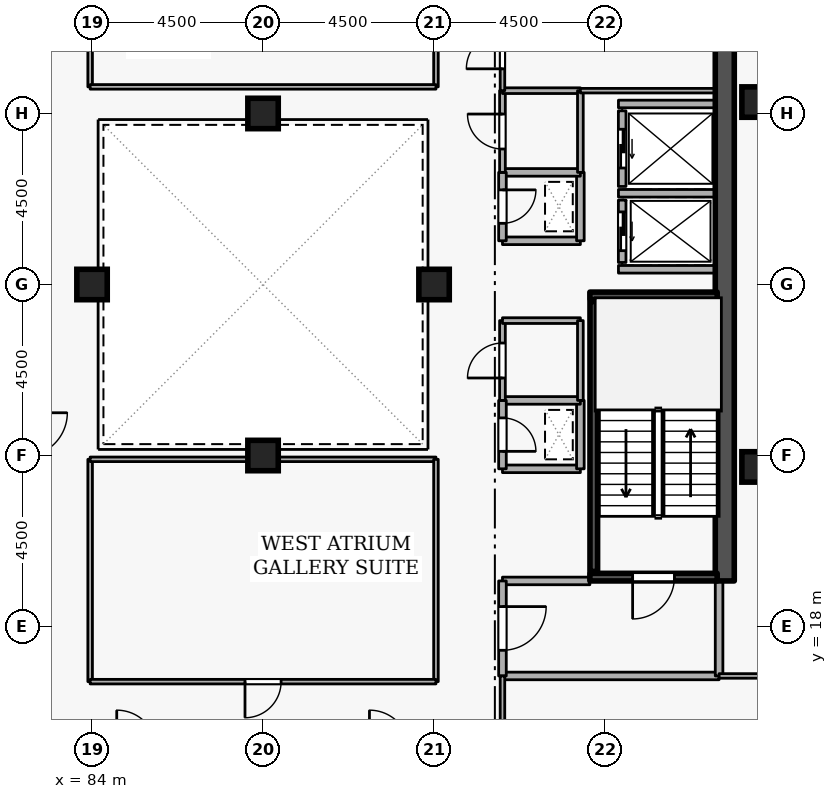
"""IFC4 building model, lengths in metres.
Left out: names, types, materials, properties, quantities, classifications, styles, units other than length and angle.
Written with IfcOpenShell. Run it as: python <this file> out.ifc"""

import sys

from ifc_helpers import new_model, si_unit, direction, frame, frame_2d, origin, origin_2d, place, context, subcontext, project, spatial, rectangle, extrude, element, fill, save


model = new_model("IFC4")
c1 = context("Model", 3, precision=1e-05, world=origin(), true_north=direction((0.0, 1.0)))
c2 = subcontext(c1, "Body", "Model", "MODEL_VIEW")
j1 = project(units=[si_unit("LENGTHUNIT", "METRE"), si_unit("PLANEANGLEUNIT", "RADIAN")], contexts=[c1])
p1 = place(None, origin())
s1 = spatial("IfcSite", under=j1, at=p1, CompositionType="ELEMENT")
p2 = place(p1, origin())
s2 = spatial("IfcBuilding", under=s1, at=p2, CompositionType="ELEMENT")
p3 = place(p2, frame((0.0, 0.0, 258.3)))
s3 = spatial("IfcBuildingStorey", under=s2, at=p3, CompositionType="ELEMENT", Elevation=258.3)
p4 = place(p3, frame((100.65, 19.2, 0.0), z_axis=(0.0, 0.0, 1.0), x_axis=(0.0, 1.0, 0.0)))
e1 = element("IfcWall", 1, at=p4, inside=s3, PredefinedType="SHEAR", context=c2, shape_type="SweptSolid", body=[
    extrude(rectangle(XDim=15.6, YDim=0.5, at=frame_2d((7.8, 0.0))), origin(), (0.0, 0.0, 1.0), 3.6),
])
for number, where, z_axis, x_axis in (
    (2, (101.5, 22.2, 0.0), (0.0, 0.0, 1.0), (1.0, 0.0, 0.0)),
    (3, (101.5, 31.8, 0.0), (0.0, 0.0, 1.0), (1.0, 0.0, 0.0)),
    (4, (93.0, 27.0, 0.0), (0.0, 0.0, 1.0), (1.0, 0.0, 0.0)),
    (5, (84.0, 27.0, 0.0), (0.0, 0.0, 1.0), (1.0, 0.0, 0.0)),
    (6, (88.5, 22.5, 0.0), (0.0, 0.0, 1.0), (1.0, 0.0, 0.0)),
    (7, (88.5, 31.5, 0.0), (0.0, 0.0, 1.0), (1.0, 0.0, 0.0)),
):
    element("IfcColumn", number, at=place(p3, frame(where, z_axis=z_axis, x_axis=x_axis)), inside=s3, PredefinedType="COLUMN", context=c2, shape_type="SweptSolid", body=[
        extrude(rectangle(XDim=0.8, YDim=0.8, at=origin_2d()), origin(), (0.0, 0.0, 1.0), 3.6),
    ])
p5 = place(p3, frame((97.95, 29.22, 0.0), z_axis=(0.0, 0.0, 1.0), x_axis=(0.0, -1.0, 0.0)))
e8 = element("IfcWall", 8, at=p5, inside=s3, PredefinedType="STANDARD", context=c2, shape_type="SweptSolid", body=[
    extrude(rectangle(XDim=1.64, YDim=0.2, at=frame_2d((0.82, 0.0))), origin(), (0.0, 0.0, 1.0), 3.34),
])
p6 = place(p5, frame((0.31, 0.0, 0.0)))
e9 = element("IfcOpeningElement", 9, at=p6, cuts=e8, PredefinedType="OPENING", context=c2, shape_type="SweptSolid", body=[
    extrude(rectangle(XDim=1.02, YDim=2.06, at=frame_2d((0.51, 1.03))), frame((0.0, 0.11, 0.0), z_axis=(0.0, -1.0, 0.0), x_axis=(1.0, 0.0, 0.0)), (0.0, 0.0, 1.0), 0.22),
])
p7 = place(p3, frame((97.95, 31.57, 0.0), z_axis=(0.0, 0.0, 1.0), x_axis=(0.0, -1.0, 0.0)))
e10 = element("IfcWall", 10, at=p7, inside=s3, PredefinedType="STANDARD", context=c2, shape_type="SweptSolid", body=[
    extrude(rectangle(XDim=1.99, YDim=0.2, at=frame_2d((0.995, 0.0))), origin(), (0.0, 0.0, 1.0), 3.34),
])
p8 = place(p7, frame((0.485, 0.0, 0.0)))
e11 = element("IfcOpeningElement", 11, at=p8, cuts=e10, PredefinedType="OPENING", context=c2, shape_type="SweptSolid", body=[
    extrude(rectangle(XDim=1.02, YDim=2.06, at=frame_2d((0.51, 1.03))), frame((0.0, 0.11, 0.0), z_axis=(0.0, -1.0, 0.0), x_axis=(1.0, 0.0, 0.0)), (0.0, 0.0, 1.0), 0.22),
])
for number, where, z_axis, x_axis in (
    (12, (97.852, 29.4, 0.0), (0.0, 0.0, 1.0), (1.0, 0.0, 0.0)),
    (13, (97.852, 27.4, 0.0), (0.0, 0.0, 1.0), (1.0, 0.0, 0.0)),
    (14, (97.852, 31.75, 0.0), (0.0, 0.0, 1.0), (1.0, 0.0, 0.0)),
):
    element("IfcWall", number, at=place(p3, frame(where, z_axis=z_axis, x_axis=x_axis)), inside=s3, PredefinedType="STANDARD", context=c2, shape_type="SweptSolid", body=[
        extrude(rectangle(XDim=2.536, YDim=0.2, at=frame_2d((1.268, 0.0))), origin(), (0.0, 0.0, 1.0), 3.34),
    ])
p9 = place(p3, frame((100.45, 19.3, 0.0), z_axis=(0.0, 0.0, 1.0), x_axis=(-1.0, 0.0, 0.0)))
e15 = element("IfcWall", 15, at=p9, inside=s3, PredefinedType="SHEAR", context=c2, shape_type="SweptSolid", body=[
    extrude(rectangle(XDim=3.35, YDim=0.2, at=frame_2d((1.675, 0.0))), origin(), (0.0, 0.0, 1.0), 3.6),
])
p10 = place(p9, frame((1.125, 0.0, 0.0)))
e16 = element("IfcOpeningElement", 16, at=p10, cuts=e15, PredefinedType="OPENING", context=c2, shape_type="SweptSolid", body=[
    extrude(rectangle(XDim=1.1, YDim=2.1, at=frame_2d((0.55, 1.05))), frame((0.0, 0.11, 0.0), z_axis=(0.0, -1.0, 0.0), x_axis=(1.0, 0.0, 0.0)), (0.0, 0.0, 1.0), 0.22),
])
p11 = place(p3, frame((97.1, 26.7, 0.0), z_axis=(0.0, 0.0, 1.0), x_axis=(1.0, 0.0, 0.0)))
e17 = element("IfcWall", 17, at=p11, inside=s3, PredefinedType="SHEAR", context=c2, shape_type="SweptSolid", body=[
    extrude(rectangle(XDim=3.35, YDim=0.2, at=frame_2d((1.675, 0.0))), origin(), (0.0, 0.0, 1.0), 3.6),
])
p12 = place(p3, frame((97.203, 26.55, 0.0), z_axis=(0.0, 0.0, 1.0), x_axis=(0.0, -1.0, 0.0)))
e18 = element("IfcWall", 18, at=p12, inside=s3, PredefinedType="SHEAR", context=c2, shape_type="SweptSolid", body=[
    extrude(rectangle(XDim=7.1, YDim=0.2, at=frame_2d((3.55, 0.0))), origin(), (0.0, 0.0, 1.0), 3.6),
])
p13 = place(p3, frame((94.8, 16.7, 0.0), z_axis=(0.0, 0.0, 1.0), x_axis=(1.0, 0.0, 0.0)))
e19 = element("IfcWall", 19, at=p13, inside=s3, PredefinedType="STANDARD", context=c2, shape_type="SweptSolid", body=[
    extrude(rectangle(XDim=5.7, YDim=0.2, at=frame_2d((2.85, 0.0))), origin(), (0.0, 0.0, 1.0), 3.34),
])
p14 = place(p3, frame((100.5, 16.7, 0.0), z_axis=(0.0, 0.0, 1.0), x_axis=(0.0, 1.0, 0.0)))
e20 = element("IfcWall", 20, at=p14, inside=s3, PredefinedType="STANDARD", context=c2, shape_type="SweptSolid", body=[
    extrude(rectangle(XDim=2.5, YDim=0.2, at=frame_2d((1.25, 0.0))), origin(), (0.0, 0.0, 1.0), 3.34),
])
p15 = place(p3, frame((97.1, 19.2, 0.0), z_axis=(0.0, 0.0, 1.0), x_axis=(-1.0, 0.0, 0.0)))
e21 = element("IfcWall", 21, at=p15, inside=s3, PredefinedType="STANDARD", context=c2, shape_type="SweptSolid", body=[
    extrude(rectangle(XDim=2.3, YDim=0.2, at=frame_2d((1.15, 0.0))), origin(), (0.0, 0.0, 1.0), 2.545),
])
p16 = place(p3, frame((94.8, 19.2, 0.0), z_axis=(0.0, 0.0, 1.0), x_axis=(0.0, -1.0, 0.0)))
e22 = element("IfcWall", 22, at=p16, inside=s3, PredefinedType="STANDARD", context=c2, shape_type="SweptSolid", body=[
    extrude(rectangle(XDim=2.5, YDim=0.2, at=frame_2d((1.25, 0.0))), origin(), (0.0, 0.0, 1.0), 3.34),
])
p17 = place(p16, frame((0.675, 0.0, 0.0)))
e23 = element("IfcOpeningElement", 23, at=p17, cuts=e22, PredefinedType="OPENING", context=c2, shape_type="SweptSolid", body=[
    extrude(rectangle(XDim=1.15, YDim=2.1, at=frame_2d((0.575, 1.05))), frame((0.0, 0.11, 0.0), z_axis=(0.0, -1.0, 0.0), x_axis=(1.0, 0.0, 0.0)), (0.0, 0.0, 1.0), 0.22),
])
p18 = place(p3, frame((94.8, 28.15, 0.0), z_axis=(0.0, 0.0, 1.0), x_axis=(1.0, 0.0, 0.0)))
e24 = element("IfcWall", 24, at=p18, inside=s3, PredefinedType="STANDARD", context=c2, shape_type="SweptSolid", body=[
    extrude(rectangle(XDim=2.05, YDim=0.2, at=frame_2d((1.025, 0.0))), origin(), (0.0, 0.0, 1.0), 3.34),
])
p19 = place(p3, frame((96.85, 28.15, 0.0), z_axis=(0.0, 0.0, 1.0), x_axis=(0.0, 1.0, 0.0)))
e25 = element("IfcWall", 25, at=p19, inside=s3, PredefinedType="STANDARD", context=c2, shape_type="SweptSolid", body=[
    extrude(rectangle(XDim=1.8, YDim=0.2, at=frame_2d((0.9, 0.0))), origin(), (0.0, 0.0, 1.0), 3.34),
])
p20 = place(p3, frame((96.85, 29.95, 0.0), z_axis=(0.0, 0.0, 1.0), x_axis=(-1.0, 0.0, 0.0)))
e26 = element("IfcWall", 26, at=p20, inside=s3, PredefinedType="STANDARD", context=c2, shape_type="SweptSolid", body=[
    extrude(rectangle(XDim=2.05, YDim=0.2, at=frame_2d((1.025, 0.0))), origin(), (0.0, 0.0, 1.0), 3.34),
])
p21 = place(p3, frame((94.8, 29.95, 0.0), z_axis=(0.0, 0.0, 1.0), x_axis=(0.0, -1.0, 0.0)))
e27 = element("IfcWall", 27, at=p21, inside=s3, PredefinedType="STANDARD", context=c2, shape_type="SweptSolid", body=[
    extrude(rectangle(XDim=1.8, YDim=0.2, at=frame_2d((0.9, 0.0))), origin(), (0.0, 0.0, 1.0), 3.34),
])
p22 = place(p21, frame((0.46, 0.0, 0.0)))
e28 = element("IfcOpeningElement", 28, at=p22, cuts=e27, PredefinedType="OPENING", context=c2, shape_type="SweptSolid", body=[
    extrude(rectangle(XDim=0.88, YDim=2.04, at=frame_2d((0.44, 1.02))), frame((0.0, 0.11, 0.0), z_axis=(0.0, -1.0, 0.0), x_axis=(1.0, 0.0, 0.0)), (0.0, 0.0, 1.0), 0.22),
])
p23 = place(p3, frame((94.8, 22.15, 0.0), z_axis=(0.0, 0.0, 1.0), x_axis=(1.0, 0.0, 0.0)))
e29 = element("IfcWall", 29, at=p23, inside=s3, PredefinedType="STANDARD", context=c2, shape_type="SweptSolid", body=[
    extrude(rectangle(XDim=2.05, YDim=0.2, at=frame_2d((1.025, 0.0))), origin(), (0.0, 0.0, 1.0), 3.34),
])
p24 = place(p3, frame((96.85, 22.15, 0.0), z_axis=(0.0, 0.0, 1.0), x_axis=(0.0, 1.0, 0.0)))
e30 = element("IfcWall", 30, at=p24, inside=s3, PredefinedType="STANDARD", context=c2, shape_type="SweptSolid", body=[
    extrude(rectangle(XDim=1.8, YDim=0.2, at=frame_2d((0.9, 0.0))), origin(), (0.0, 0.0, 1.0), 3.34),
])
p25 = place(p3, frame((96.85, 23.95, 0.0), z_axis=(0.0, 0.0, 1.0), x_axis=(-1.0, 0.0, 0.0)))
e31 = element("IfcWall", 31, at=p25, inside=s3, PredefinedType="STANDARD", context=c2, shape_type="SweptSolid", body=[
    extrude(rectangle(XDim=2.05, YDim=0.2, at=frame_2d((1.025, 0.0))), origin(), (0.0, 0.0, 1.0), 3.34),
])
p26 = place(p3, frame((94.8, 23.95, 0.0), z_axis=(0.0, 0.0, 1.0), x_axis=(0.0, -1.0, 0.0)))
e32 = element("IfcWall", 32, at=p26, inside=s3, PredefinedType="STANDARD", context=c2, shape_type="SweptSolid", body=[
    extrude(rectangle(XDim=1.8, YDim=0.2, at=frame_2d((0.9, 0.0))), origin(), (0.0, 0.0, 1.0), 3.34),
])
p27 = place(p26, frame((0.46, 0.0, 0.0)))
e33 = element("IfcOpeningElement", 33, at=p27, cuts=e32, PredefinedType="OPENING", context=c2, shape_type="SweptSolid", body=[
    extrude(rectangle(XDim=0.88, YDim=2.04, at=frame_2d((0.44, 1.02))), frame((0.0, 0.11, 0.0), z_axis=(0.0, -1.0, 0.0), x_axis=(1.0, 0.0, 0.0)), (0.0, 0.0, 1.0), 0.22),
])
p28 = place(p3, frame((94.8, 23.95, 0.0), z_axis=(0.0, 0.0, 1.0), x_axis=(0.0, 1.0, 0.0)))
e34 = element("IfcWall", 34, at=p28, inside=s3, PredefinedType="PARTITIONING", context=c2, shape_type="SweptSolid", body=[
    extrude(rectangle(XDim=2.1, YDim=0.15, at=frame_2d((1.05, 0.0))), origin(), (0.0, 0.0, 1.0), 3.34),
])
p29 = place(p28, frame((0.59, 0.0, 0.0)))
e35 = element("IfcOpeningElement", 35, at=p29, cuts=e34, PredefinedType="OPENING", context=c2, shape_type="SweptSolid", body=[
    extrude(rectangle(XDim=0.92, YDim=2.08, at=frame_2d((0.46, 1.04))), frame((0.0, 0.085, 0.0), z_axis=(0.0, -1.0, 0.0), x_axis=(1.0, 0.0, 0.0)), (0.0, 0.0, 1.0), 0.17),
])
p30 = place(p3, frame((94.8, 26.05, 0.0), z_axis=(0.0, 0.0, 1.0), x_axis=(1.0, 0.0, 0.0)))
e36 = element("IfcWall", 36, at=p30, inside=s3, PredefinedType="PARTITIONING", context=c2, shape_type="SweptSolid", body=[
    extrude(rectangle(XDim=2.05, YDim=0.15, at=frame_2d((1.025, 0.0))), origin(), (0.0, 0.0, 1.0), 3.34),
])
p31 = place(p3, frame((96.85, 26.05, 0.0), z_axis=(0.0, 0.0, 1.0), x_axis=(0.0, -1.0, 0.0)))
e37 = element("IfcWall", 37, at=p31, inside=s3, PredefinedType="PARTITIONING", context=c2, shape_type="SweptSolid", body=[
    extrude(rectangle(XDim=2.1, YDim=0.15, at=frame_2d((1.05, 0.0))), origin(), (0.0, 0.0, 1.0), 3.34),
])
p32 = place(p3, frame((94.8, 29.95, 0.0), z_axis=(0.0, 0.0, 1.0), x_axis=(0.0, 1.0, 0.0)))
e38 = element("IfcWall", 38, at=p32, inside=s3, PredefinedType="PARTITIONING", context=c2, shape_type="SweptSolid", body=[
    extrude(rectangle(XDim=2.15, YDim=0.15, at=frame_2d((1.075, 0.0))), origin(), (0.0, 0.0, 1.0), 3.34),
])
p33 = place(p32, frame((0.615, 0.0, 0.0)))
e39 = element("IfcOpeningElement", 39, at=p33, cuts=e38, PredefinedType="OPENING", context=c2, shape_type="SweptSolid", body=[
    extrude(rectangle(XDim=0.92, YDim=2.08, at=frame_2d((0.46, 1.04))), frame((0.0, 0.085, 0.0), z_axis=(0.0, -1.0, 0.0), x_axis=(1.0, 0.0, 0.0)), (0.0, 0.0, 1.0), 0.17),
])
p34 = place(p3, frame((94.8, 32.1, 0.0), z_axis=(0.0, 0.0, 1.0), x_axis=(1.0, 0.0, 0.0)))
e40 = element("IfcWall", 40, at=p34, inside=s3, PredefinedType="PARTITIONING", context=c2, shape_type="SweptSolid", body=[
    extrude(rectangle(XDim=2.05, YDim=0.15, at=frame_2d((1.025, 0.0))), origin(), (0.0, 0.0, 1.0), 3.34),
])
p35 = place(p3, frame((96.85, 32.1, 0.0), z_axis=(0.0, 0.0, 1.0), x_axis=(0.0, -1.0, 0.0)))
e41 = element("IfcWall", 41, at=p35, inside=s3, PredefinedType="PARTITIONING", context=c2, shape_type="SweptSolid", body=[
    extrude(rectangle(XDim=2.15, YDim=0.15, at=frame_2d((1.075, 0.0))), origin(), (0.0, 0.0, 1.0), 3.34),
])
p36 = place(p3, frame((94.8, 32.1, 0.0), z_axis=(0.0, 0.0, 1.0), x_axis=(0.0, 1.0, 0.0)))
e42 = element("IfcWall", 42, at=p36, inside=s3, PredefinedType="PARTITIONING", context=c2, shape_type="SweptSolid", body=[
    extrude(rectangle(XDim=2.1, YDim=0.12, at=frame_2d((1.05, 0.0))), origin(), (0.0, 0.0, 1.0), 3.34),
])
p37 = place(p36, frame((0.575, 0.0, 0.0)))
e43 = element("IfcOpeningElement", 43, at=p37, cuts=e42, PredefinedType="OPENING", context=c2, shape_type="SweptSolid", body=[
    extrude(rectangle(XDim=0.95, YDim=2.1, at=frame_2d((0.475, 1.05))), frame((0.0, 0.07, 0.0), z_axis=(0.0, -1.0, 0.0), x_axis=(1.0, 0.0, 0.0)), (0.0, 0.0, 1.0), 0.14),
])
p38 = place(p3, frame((100.4, 32.1, 0.0), z_axis=(0.0, 0.0, 1.0), x_axis=(-1.0, 0.0, 0.0)))
e44 = element("IfcWall", 44, at=p38, inside=s3, PredefinedType="PARTITIONING", context=c2, shape_type="SweptSolid", body=[
    extrude(rectangle(XDim=3.55, YDim=0.12, at=frame_2d((1.775, 0.0))), origin(), (0.0, 0.0, 1.0), 3.34),
])
p39 = place(p3, frame((94.8, 14.75, 0.0), z_axis=(0.0, 0.0, 1.0), x_axis=(0.0, 1.0, 0.0)))
e45 = element("IfcWall", 45, at=p39, inside=s3, PredefinedType="PARTITIONING", context=c2, shape_type="SweptSolid", body=[
    extrude(rectangle(XDim=1.95, YDim=0.12, at=frame_2d((0.975, 0.0))), origin(), (0.0, 0.0, 1.0), 3.34),
])
p40 = place(p3, frame((100.5, 16.7, 0.0), z_axis=(0.0, 0.0, 1.0), x_axis=(1.0, 0.0, 0.0)))
e46 = element("IfcWall", 46, at=p40, inside=s3, PredefinedType="PARTITIONING", context=c2, shape_type="SweptSolid", body=[
    extrude(rectangle(XDim=11.72, YDim=0.12, at=frame_2d((5.86, 0.0))), origin(), (0.0, 0.0, 1.0), 3.34),
])
p41 = place(p3, frame((83.95, 16.55, 0.0), z_axis=(0.0, 0.0, 1.0), x_axis=(0.0, 1.0, 0.0)))
e47 = element("IfcWall", 47, at=p41, inside=s3, PredefinedType="PARTITIONING", context=c2, shape_type="SweptSolid", body=[
    extrude(rectangle(XDim=5.85, YDim=0.12, at=frame_2d((2.925, 0.0))), origin(), (0.0, 0.0, 1.0), 3.34),
])
p42 = place(p3, frame((83.95, 22.4, 0.0), z_axis=(0.0, 0.0, 1.0), x_axis=(1.0, 0.0, 0.0)))
e48 = element("IfcWall", 48, at=p42, inside=s3, PredefinedType="PARTITIONING", context=c2, shape_type="SweptSolid", body=[
    extrude(rectangle(XDim=9.1, YDim=0.12, at=frame_2d((4.55, 0.0))), origin(), (0.0, 0.0, 1.0), 3.34),
])
p43 = place(p3, frame((93.05, 22.4, 0.0), z_axis=(0.0, 0.0, 1.0), x_axis=(0.0, -1.0, 0.0)))
e49 = element("IfcWall", 49, at=p43, inside=s3, PredefinedType="PARTITIONING", context=c2, shape_type="SweptSolid", body=[
    extrude(rectangle(XDim=5.85, YDim=0.12, at=frame_2d((2.925, 0.0))), origin(), (0.0, 0.0, 1.0), 3.34),
])
p44 = place(p3, frame((93.05, 16.55, 0.0), z_axis=(0.0, 0.0, 1.0), x_axis=(-1.0, 0.0, 0.0)))
e50 = element("IfcWall", 50, at=p44, inside=s3, PredefinedType="PARTITIONING", context=c2, shape_type="SweptSolid", body=[
    extrude(rectangle(XDim=9.1, YDim=0.12, at=frame_2d((4.55, 0.0))), origin(), (0.0, 0.0, 1.0), 3.34),
])
p45 = place(p44, frame((4.075, 0.0, 0.0)))
e51 = element("IfcOpeningElement", 51, at=p45, cuts=e50, PredefinedType="OPENING", context=c2, shape_type="SweptSolid", body=[
    extrude(rectangle(XDim=0.95, YDim=2.1, at=frame_2d((0.475, 1.05))), frame((0.0, 0.07, 0.0), z_axis=(0.0, -1.0, 0.0), x_axis=(1.0, 0.0, 0.0)), (0.0, 0.0, 1.0), 0.14),
])
for number, where, z_axis, x_axis in (
    (52, (83.95, 32.2, 0.0), (0.0, 0.0, 1.0), (0.0, 1.0, 0.0)),
    (53, (93.05, 35.45, 0.0), (0.0, 0.0, 1.0), (0.0, -1.0, 0.0)),
):
    element("IfcWall", number, at=place(p3, frame(where, z_axis=z_axis, x_axis=x_axis)), inside=s3, PredefinedType="PARTITIONING", context=c2, shape_type="SweptSolid", body=[
        extrude(rectangle(XDim=3.25, YDim=0.12, at=frame_2d((1.625, 0.0))), origin(), (0.0, 0.0, 1.0), 3.34),
    ])
p46 = place(p3, frame((93.05, 32.2, 0.0), z_axis=(0.0, 0.0, 1.0), x_axis=(-1.0, 0.0, 0.0)))
e54 = element("IfcWall", 54, at=p46, inside=s3, PredefinedType="PARTITIONING", context=c2, shape_type="SweptSolid", body=[
    extrude(rectangle(XDim=9.1, YDim=0.12, at=frame_2d((4.55, 0.0))), origin(), (0.0, 0.0, 1.0), 3.34),
])
p47 = place(p6, origin())
e55 = element("IfcDoor", 55, at=p47, inside=s3, OperationType="SLIDING_TO_LEFT", PredefinedType="DOOR", context=c2, shape_type="SweptSolid", body=[
    extrude(rectangle(XDim=1.02, YDim=2.06, at=frame_2d((0.51, 1.03))), frame((0.0, 0.025, 0.0), z_axis=(0.0, -1.0, 0.0), x_axis=(1.0, 0.0, 0.0)), (0.0, 0.0, 1.0), 0.05),
])
fill(e9, e55)
p48 = place(p8, origin())
e56 = element("IfcDoor", 56, at=p48, inside=s3, OperationType="SLIDING_TO_LEFT", PredefinedType="DOOR", context=c2, shape_type="SweptSolid", body=[
    extrude(rectangle(XDim=1.02, YDim=2.06, at=frame_2d((0.51, 1.03))), frame((0.0, 0.025, 0.0), z_axis=(0.0, -1.0, 0.0), x_axis=(1.0, 0.0, 0.0)), (0.0, 0.0, 1.0), 0.05),
])
fill(e11, e56)
p49 = place(p10, origin())
e57 = element("IfcDoor", 57, at=p49, inside=s3, OperationType="SINGLE_SWING_RIGHT", PredefinedType="DOOR", context=c2, shape_type="SweptSolid", body=[
    extrude(rectangle(XDim=1.1, YDim=2.1, at=frame_2d((0.55, 1.05))), frame((0.0, 0.025, 0.0), z_axis=(0.0, -1.0, 0.0), x_axis=(1.0, 0.0, 0.0)), (0.0, 0.0, 1.0), 0.05),
])
fill(e16, e57)
p50 = place(p17, origin())
e58 = element("IfcDoor", 58, at=p50, inside=s3, OperationType="SINGLE_SWING_LEFT", PredefinedType="DOOR", context=c2, shape_type="SweptSolid", body=[
    extrude(rectangle(XDim=1.15, YDim=2.1, at=frame_2d((0.575, 1.05))), frame((0.0, 0.025, 0.0), z_axis=(0.0, -1.0, 0.0), x_axis=(1.0, 0.0, 0.0)), (0.0, 0.0, 1.0), 0.05),
])
fill(e23, e58)
p51 = place(p22, origin())
e59 = element("IfcDoor", 59, at=p51, inside=s3, OperationType="SINGLE_SWING_LEFT", PredefinedType="DOOR", context=c2, shape_type="SweptSolid", body=[
    extrude(rectangle(XDim=0.88, YDim=2.04, at=frame_2d((0.44, 1.02))), frame((0.0, 0.025, 0.0), z_axis=(0.0, -1.0, 0.0), x_axis=(1.0, 0.0, 0.0)), (0.0, 0.0, 1.0), 0.05),
])
fill(e28, e59)
p52 = place(p27, origin())
e60 = element("IfcDoor", 60, at=p52, inside=s3, OperationType="SINGLE_SWING_RIGHT", PredefinedType="DOOR", context=c2, shape_type="SweptSolid", body=[
    extrude(rectangle(XDim=0.88, YDim=2.04, at=frame_2d((0.44, 1.02))), frame((0.0, 0.025, 0.0), z_axis=(0.0, -1.0, 0.0), x_axis=(1.0, 0.0, 0.0)), (0.0, 0.0, 1.0), 0.05),
])
fill(e33, e60)
p53 = place(p29, origin())
e61 = element("IfcDoor", 61, at=p53, inside=s3, OperationType="SINGLE_SWING_LEFT", PredefinedType="DOOR", context=c2, shape_type="SweptSolid", body=[
    extrude(rectangle(XDim=0.92, YDim=2.08, at=frame_2d((0.46, 1.04))), frame((0.0, 0.025, 0.0), z_axis=(0.0, -1.0, 0.0), x_axis=(1.0, 0.0, 0.0)), (0.0, 0.0, 1.0), 0.05),
])
fill(e35, e61)
p54 = place(p33, origin())
e62 = element("IfcDoor", 62, at=p54, inside=s3, OperationType="SINGLE_SWING_RIGHT", PredefinedType="DOOR", context=c2, shape_type="SweptSolid", body=[
    extrude(rectangle(XDim=0.92, YDim=2.08, at=frame_2d((0.46, 1.04))), frame((0.0, 0.025, 0.0), z_axis=(0.0, -1.0, 0.0), x_axis=(1.0, 0.0, 0.0)), (0.0, 0.0, 1.0), 0.05),
])
fill(e39, e62)
p55 = place(p37, origin())
e63 = element("IfcDoor", 63, at=p55, inside=s3, OperationType="SINGLE_SWING_LEFT", PredefinedType="DOOR", context=c2, shape_type="SweptSolid", body=[
    extrude(rectangle(XDim=0.95, YDim=2.1, at=frame_2d((0.475, 1.05))), frame((0.0, 0.025, 0.0), z_axis=(0.0, -1.0, 0.0), x_axis=(1.0, 0.0, 0.0)), (0.0, 0.0, 1.0), 0.05),
])
fill(e43, e63)
p56 = place(p45, origin())
e64 = element("IfcDoor", 64, at=p56, inside=s3, OperationType="SINGLE_SWING_RIGHT", PredefinedType="DOOR", context=c2, shape_type="SweptSolid", body=[
    extrude(rectangle(XDim=0.95, YDim=2.1, at=frame_2d((0.475, 1.05))), frame((0.0, 0.025, 0.0), z_axis=(0.0, -1.0, 0.0), x_axis=(1.0, 0.0, 0.0)), (0.0, 0.0, 1.0), 0.05),
])
fill(e51, e64)
save(model, sys.argv[1])
